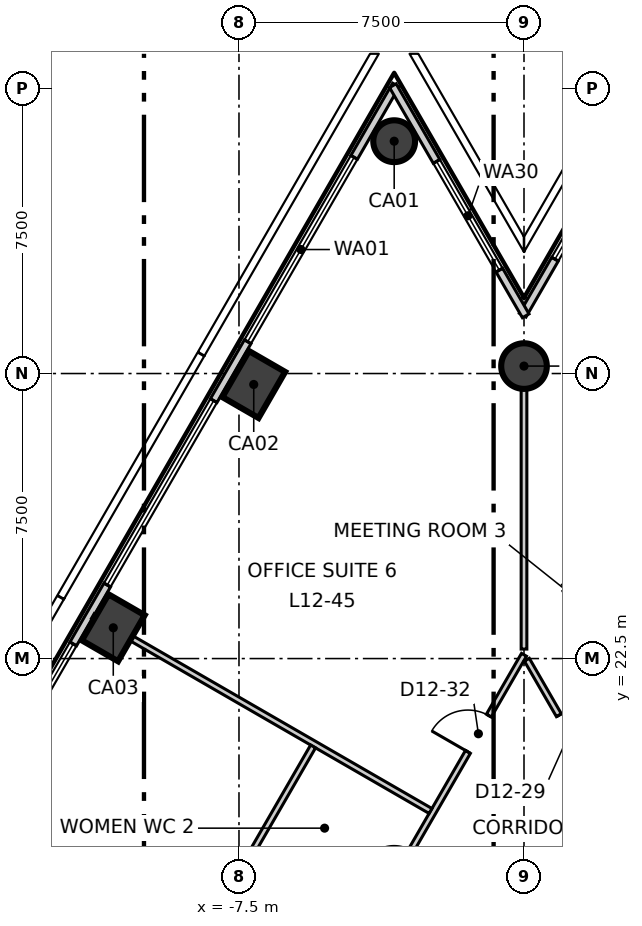
"""IFC4 building model, lengths in metres.
Left out: names, types, materials, properties, quantities, classifications, styles, units other than length and angle.
Written with IfcOpenShell. Run it as: python <this file> out.ifc"""

import sys

from ifc_helpers import new_model, si_unit, direction, frame, frame_2d, origin, origin_2d, place, context, subcontext, project, spatial, rectangle, circle, extrude, element, fill, save


model = new_model("IFC4")
c1 = context("Model", 3, precision=1e-05, world=origin(), true_north=direction((0.0, 1.0)))
c2 = subcontext(c1, "Body", "Model", "MODEL_VIEW")
j1 = project(units=[si_unit("LENGTHUNIT", "METRE"), si_unit("PLANEANGLEUNIT", "RADIAN")], contexts=[c1])
p1 = place(None, origin())
s1 = spatial("IfcSite", under=j1, at=p1, CompositionType="ELEMENT")
p2 = place(p1, origin())
s2 = spatial("IfcBuilding", under=s1, at=p2, CompositionType="ELEMENT")
p3 = place(p2, frame((0.0, 0.0, 59.3)))
s3 = spatial("IfcBuildingStorey", under=s2, at=p3, CompositionType="ELEMENT", Elevation=59.3)
p4 = place(p3, frame((-3.416, 36.113, -0.3), z_axis=(0.0, 0.0, 1.0), x_axis=(0.5, 0.866025403784, 0.0)))
e1 = element("IfcColumn", 1, at=p4, inside=s3, PredefinedType="COLUMN", context=c2, shape_type="SweptSolid", body=[
    extrude(circle(Radius=0.55, at=origin_2d()), origin(), (0.0, 0.0, 1.0), 4.0),
])
for number, where, z_axis, x_axis in (
    (2, (-7.112, 29.712, -0.3), (0.0, 0.0, 1.0), (0.5, 0.866, 0.0)),
    (3, (-10.808, 23.31, -0.3), (0.0, 0.0, 1.0), (0.5, 0.866, 0.0)),
):
    element("IfcColumn", number, at=place(p3, frame(where, z_axis=z_axis, x_axis=x_axis)), inside=s3, PredefinedType="COLUMN", context=c2, shape_type="SweptSolid", body=[
        extrude(rectangle(XDim=1.4, YDim=1.1, at=origin_2d()), origin(), (0.0, 0.0, 1.0), 4.0),
    ])
p5 = place(p3, frame((0.0, 30.196, -0.3), z_axis=(0.0, 0.0, 1.0), x_axis=(1.0, 0.0, 0.0)))
e4 = element("IfcColumn", 4, at=p5, inside=s3, PredefinedType="COLUMN", context=c2, shape_type="SweptSolid", body=[
    extrude(circle(Radius=0.6, at=origin_2d()), origin(), (0.0, 0.0, 1.0), 4.0),
])
p6 = place(p3, frame((-3.371, 37.591, 0.0), z_axis=(0.0, 0.0, 1.0), x_axis=(-0.500006313899, -0.866021758423, 0.0)))
e5 = element("IfcWall", 5, at=p6, inside=s3, PredefinedType="ELEMENTEDWALL", context=c2, shape_type="SweptSolid", body=[
    extrude(rectangle(XDim=61.719, YDim=0.2, at=frame_2d((30.859, 0.0))), origin(), (0.0, 0.0, 1.0), 3.7),
])
p7 = place(p6, frame((2.198, 0.0, 0.9)))
e6 = element("IfcOpeningElement", 6, at=p7, cuts=e5, PredefinedType="OPENING", context=c2, shape_type="SweptSolid", body=[
    extrude(rectangle(XDim=5.6, YDim=2.5, at=frame_2d((2.8, 1.25))), frame((0.0, 0.11, 0.0), z_axis=(0.0, -1.0, 0.0), x_axis=(1.0, 0.0, 0.0)), (0.0, 0.0, 1.0), 0.22),
])
p8 = place(p6, frame((9.59, 0.0, 0.9)))
e7 = element("IfcOpeningElement", 7, at=p8, cuts=e5, PredefinedType="OPENING", context=c2, shape_type="SweptSolid", body=[
    extrude(rectangle(XDim=5.6, YDim=2.5, at=frame_2d((2.8, 1.25))), frame((0.0, 0.11, 0.0), z_axis=(0.0, -1.0, 0.0), x_axis=(1.0, 0.0, 0.0)), (0.0, 0.0, 1.0), 0.22),
])
p9 = place(p6, frame((16.982, 0.0, 0.9)))
e8 = element("IfcOpeningElement", 8, at=p9, cuts=e5, PredefinedType="OPENING", context=c2, shape_type="SweptSolid", body=[
    extrude(rectangle(XDim=5.6, YDim=2.5, at=frame_2d((2.8, 1.25))), frame((0.0, 0.11, 0.0), z_axis=(0.0, -1.0, 0.0), x_axis=(1.0, 0.0, 0.0)), (0.0, 0.0, 1.0), 0.22),
])
p10 = place(p6, frame((24.373, 0.0, 0.9)))
e9 = element("IfcOpeningElement", 9, at=p10, cuts=e5, PredefinedType="OPENING", context=c2, shape_type="SweptSolid", body=[
    extrude(rectangle(XDim=5.6, YDim=2.5, at=frame_2d((2.8, 1.25))), frame((0.0, 0.11, 0.0), z_axis=(0.0, -1.0, 0.0), x_axis=(1.0, 0.0, 0.0)), (0.0, 0.0, 1.0), 0.22),
])
p11 = place(p6, frame((31.765, 0.0, 0.9)))
e10 = element("IfcOpeningElement", 10, at=p11, cuts=e5, PredefinedType="OPENING", context=c2, shape_type="SweptSolid", body=[
    extrude(rectangle(XDim=5.6, YDim=2.5, at=frame_2d((2.8, 1.25))), frame((0.0, 0.11, 0.0), z_axis=(0.0, -1.0, 0.0), x_axis=(1.0, 0.0, 0.0)), (0.0, 0.0, 1.0), 0.22),
])
p12 = place(p6, frame((39.157, 0.0, 0.9)))
e11 = element("IfcOpeningElement", 11, at=p12, cuts=e5, PredefinedType="OPENING", context=c2, shape_type="SweptSolid", body=[
    extrude(rectangle(XDim=5.6, YDim=2.5, at=frame_2d((2.8, 1.25))), frame((0.0, 0.11, 0.0), z_axis=(0.0, -1.0, 0.0), x_axis=(1.0, 0.0, 0.0)), (0.0, 0.0, 1.0), 0.22),
])
p13 = place(p6, frame((46.548, 0.0, 0.9)))
e12 = element("IfcOpeningElement", 12, at=p13, cuts=e5, PredefinedType="OPENING", context=c2, shape_type="SweptSolid", body=[
    extrude(rectangle(XDim=5.6, YDim=2.5, at=frame_2d((2.8, 1.25))), frame((0.0, 0.11, 0.0), z_axis=(0.0, -1.0, 0.0), x_axis=(1.0, 0.0, 0.0)), (0.0, 0.0, 1.0), 0.22),
])
p14 = place(p6, frame((53.94, 0.0, 0.9)))
e13 = element("IfcOpeningElement", 13, at=p14, cuts=e5, PredefinedType="OPENING", context=c2, shape_type="SweptSolid", body=[
    extrude(rectangle(XDim=5.6, YDim=2.5, at=frame_2d((2.8, 1.25))), frame((0.0, 0.11, 0.0), z_axis=(0.0, -1.0, 0.0), x_axis=(1.0, 0.0, 0.0)), (0.0, 0.0, 1.0), 0.22),
])
p15 = place(p3, frame((3.461, 37.591, 0.0), z_axis=(0.0, 0.0, 1.0), x_axis=(-0.499927968592, -0.866066987143, 0.0)))
e14 = element("IfcWall", 14, at=p15, inside=s3, PredefinedType="ELEMENTEDWALL", context=c2, shape_type="SweptSolid", body=[
    extrude(rectangle(XDim=6.993, YDim=0.2, at=frame_2d((3.496, 0.0))), origin(), (0.0, 0.0, 1.0), 3.7),
])
p16 = place(p15, frame((1.99, 0.0, 0.9)))
e15 = element("IfcOpeningElement", 15, at=p16, cuts=e14, PredefinedType="OPENING", context=c2, shape_type="SweptSolid", body=[
    extrude(rectangle(XDim=3.3, YDim=2.5, at=frame_2d((1.65, 1.25))), frame((0.0, 0.11, 0.0), z_axis=(0.0, -1.0, 0.0), x_axis=(1.0, 0.0, 0.0)), (0.0, 0.0, 1.0), 0.22),
])
p17 = place(p3, frame((0.045, 31.518, 0.0), z_axis=(0.0, 0.0, 1.0), x_axis=(-0.499943085557, 0.86605826086, 0.0)))
e16 = element("IfcWall", 16, at=p17, inside=s3, PredefinedType="ELEMENTEDWALL", context=c2, shape_type="SweptSolid", body=[
    extrude(rectangle(XDim=6.992, YDim=0.2, at=frame_2d((3.496, 0.0))), origin(), (0.0, 0.0, 1.0), 3.7),
])
p18 = place(p17, frame((1.39, 0.0, 0.9)))
e17 = element("IfcOpeningElement", 17, at=p18, cuts=e16, PredefinedType="OPENING", context=c2, shape_type="SweptSolid", body=[
    extrude(rectangle(XDim=3.3, YDim=2.5, at=frame_2d((1.65, 1.25))), frame((0.0, 0.11, 0.0), z_axis=(0.0, -1.0, 0.0), x_axis=(1.0, 0.0, 0.0)), (0.0, 0.0, 1.0), 0.22),
])
p19 = place(p3, frame((-19.497, -11.17, 0.0), z_axis=(0.0, 0.0, 1.0), x_axis=(0.499998854553, 0.866026065108, 0.0)))
e18 = element("IfcWall", 18, at=p19, inside=s3, PredefinedType="PARTITIONING", context=c2, shape_type="SweptSolid", body=[
    extrude(rectangle(XDim=38.994, YDim=0.15, at=frame_2d((19.497, 0.0))), origin(), (0.0, 0.0, 1.0), 3.7),
])
p20 = place(p19, frame((36.044, 0.0, 0.0)))
e19 = element("IfcOpeningElement", 19, at=p20, cuts=e18, PredefinedType="OPENING", context=c2, shape_type="SweptSolid", body=[
    extrude(rectangle(XDim=1.1, YDim=2.1, at=frame_2d((0.55, 1.05))), frame((0.0, 0.085, 0.0), z_axis=(0.0, -1.0, 0.0), x_axis=(1.0, 0.0, 0.0)), (0.0, 0.0, 1.0), 0.17),
])
p21 = place(p19, frame((21.855, 0.0, 0.0)))
e20 = element("IfcOpeningElement", 20, at=p21, cuts=e18, PredefinedType="OPENING", context=c2, shape_type="SweptSolid", body=[
    extrude(rectangle(XDim=1.1, YDim=2.1, at=frame_2d((0.55, 1.05))), frame((0.0, 0.085, 0.0), z_axis=(0.0, -1.0, 0.0), x_axis=(1.0, 0.0, 0.0)), (0.0, 0.0, 1.0), 0.17),
])
p22 = place(p19, frame((32.155, 0.0, 0.0)))
e21 = element("IfcOpeningElement", 21, at=p22, cuts=e18, PredefinedType="OPENING", context=c2, shape_type="SweptSolid", body=[
    extrude(rectangle(XDim=0.9, YDim=2.1, at=frame_2d((0.45, 1.05))), frame((0.0, 0.085, 0.0), z_axis=(0.0, -1.0, 0.0), x_axis=(1.0, 0.0, 0.0)), (0.0, 0.0, 1.0), 0.17),
])
p23 = place(p19, frame((28.955, 0.0, 0.0)))
e22 = element("IfcOpeningElement", 22, at=p23, cuts=e18, PredefinedType="OPENING", context=c2, shape_type="SweptSolid", body=[
    extrude(rectangle(XDim=0.9, YDim=2.1, at=frame_2d((0.45, 1.05))), frame((0.0, 0.085, 0.0), z_axis=(0.0, -1.0, 0.0), x_axis=(1.0, 0.0, 0.0)), (0.0, 0.0, 1.0), 0.17),
])
p24 = place(p19, frame((26.055, 0.0, 0.0)))
e23 = element("IfcOpeningElement", 23, at=p24, cuts=e18, PredefinedType="OPENING", context=c2, shape_type="SweptSolid", body=[
    extrude(rectangle(XDim=1.0, YDim=2.1, at=frame_2d((0.5, 1.05))), frame((0.0, 0.085, 0.0), z_axis=(0.0, -1.0, 0.0), x_axis=(1.0, 0.0, 0.0)), (0.0, 0.0, 1.0), 0.17),
])
p25 = place(p19, frame((10.373, 0.0, 0.0)))
e24 = element("IfcOpeningElement", 24, at=p25, cuts=e18, PredefinedType="OPENING", context=c2, shape_type="SweptSolid", body=[
    extrude(rectangle(XDim=1.0, YDim=2.1, at=frame_2d((0.5, 1.05))), frame((0.0, 0.085, 0.0), z_axis=(0.0, -1.0, 0.0), x_axis=(1.0, 0.0, 0.0)), (0.0, 0.0, 1.0), 0.17),
])
p26 = place(p19, frame((17.773, 0.0, 0.0)))
e25 = element("IfcOpeningElement", 25, at=p26, cuts=e18, PredefinedType="OPENING", context=c2, shape_type="SweptSolid", body=[
    extrude(rectangle(XDim=0.9, YDim=2.1, at=frame_2d((0.45, 1.05))), frame((0.0, 0.085, 0.0), z_axis=(0.0, -1.0, 0.0), x_axis=(1.0, 0.0, 0.0)), (0.0, 0.0, 1.0), 0.17),
])
p27 = place(p19, frame((1.689, 0.0, 0.0)))
e26 = element("IfcOpeningElement", 26, at=p27, cuts=e18, PredefinedType="OPENING", context=c2, shape_type="SweptSolid", body=[
    extrude(rectangle(XDim=1.1, YDim=2.1, at=frame_2d((0.55, 1.05))), frame((0.0, 0.085, 0.0), z_axis=(0.0, -1.0, 0.0), x_axis=(1.0, 0.0, 0.0)), (0.0, 0.0, 1.0), 0.17),
])
p28 = place(p3, frame((-11.345, 23.62, 0.0), z_axis=(0.0, 0.0, 1.0), x_axis=(0.866010033384, -0.500026621369, 0.0)))
e27 = element("IfcWall", 27, at=p28, inside=s3, PredefinedType="PARTITIONING", context=c2, shape_type="SweptSolid", body=[
    extrude(rectangle(XDim=10.26, YDim=0.15, at=frame_2d((5.13, 0.0))), origin(), (0.0, 0.0, 1.0), 3.7),
])
p29 = place(p3, frame((-9.912, 12.631, 0.0), z_axis=(0.0, 0.0, 1.0), x_axis=(0.49992187278, 0.866070505857, 0.0)))
e28 = element("IfcWall", 28, at=p29, inside=s3, PredefinedType="PARTITIONING", context=c2, shape_type="SweptSolid", body=[
    extrude(rectangle(XDim=8.726, YDim=0.15, at=frame_2d((4.363, 0.0))), origin(), (0.0, 0.0, 1.0), 3.7),
])
p30 = place(p3, frame((0.0, 22.75, 0.0), z_axis=(0.0, 0.0, 1.0), x_axis=(0.0, 1.0, 0.0)))
e29 = element("IfcWall", 29, at=p30, inside=s3, PredefinedType="PARTITIONING", context=c2, shape_type="SweptSolid", body=[
    extrude(rectangle(XDim=8.066, YDim=0.15, at=frame_2d((4.033, 0.0))), origin(), (0.0, 0.0, 1.0), 3.1),
])
p31 = place(p3, frame((0.075, 22.47, 0.0), z_axis=(0.0, 0.0, 1.0), x_axis=(0.500002280369, -0.866024087209, 0.0)))
e30 = element("IfcWall", 30, at=p31, inside=s3, PredefinedType="PARTITIONING", context=c2, shape_type="SweptSolid", body=[
    extrude(rectangle(XDim=38.844, YDim=0.15, at=frame_2d((19.422, 0.0))), origin(), (0.0, 0.0, 1.0), 3.7),
])
p32 = place(p31, frame((36.044, 0.0, 0.0)))
e31 = element("IfcOpeningElement", 31, at=p32, cuts=e30, PredefinedType="OPENING", context=c2, shape_type="SweptSolid", body=[
    extrude(rectangle(XDim=1.1, YDim=2.1, at=frame_2d((0.55, 1.05))), frame((0.0, 0.085, 0.0), z_axis=(0.0, -1.0, 0.0), x_axis=(1.0, 0.0, 0.0)), (0.0, 0.0, 1.0), 0.17),
])
p33 = place(p31, frame((26.255, 0.0, 0.0)))
e32 = element("IfcOpeningElement", 32, at=p33, cuts=e30, PredefinedType="OPENING", context=c2, shape_type="SweptSolid", body=[
    extrude(rectangle(XDim=1.1, YDim=2.1, at=frame_2d((0.55, 1.05))), frame((0.0, 0.085, 0.0), z_axis=(0.0, -1.0, 0.0), x_axis=(1.0, 0.0, 0.0)), (0.0, 0.0, 1.0), 0.17),
])
p34 = place(p31, frame((9.173, 0.0, 0.0)))
e33 = element("IfcOpeningElement", 33, at=p34, cuts=e30, PredefinedType="OPENING", context=c2, shape_type="SweptSolid", body=[
    extrude(rectangle(XDim=1.1, YDim=2.1, at=frame_2d((0.55, 1.05))), frame((0.0, 0.085, 0.0), z_axis=(0.0, -1.0, 0.0), x_axis=(1.0, 0.0, 0.0)), (0.0, 0.0, 1.0), 0.17),
])
p35 = place(p31, frame((17.373, 0.0, 0.0)))
e34 = element("IfcOpeningElement", 34, at=p35, cuts=e30, PredefinedType="OPENING", context=c2, shape_type="SweptSolid", body=[
    extrude(rectangle(XDim=0.9, YDim=2.1, at=frame_2d((0.45, 1.05))), frame((0.0, 0.085, 0.0), z_axis=(0.0, -1.0, 0.0), x_axis=(1.0, 0.0, 0.0)), (0.0, 0.0, 1.0), 0.17),
])
p36 = place(p31, frame((14.173, 0.0, 0.0)))
e35 = element("IfcOpeningElement", 35, at=p36, cuts=e30, PredefinedType="OPENING", context=c2, shape_type="SweptSolid", body=[
    extrude(rectangle(XDim=0.9, YDim=2.1, at=frame_2d((0.45, 1.05))), frame((0.0, 0.085, 0.0), z_axis=(0.0, -1.0, 0.0), x_axis=(1.0, 0.0, 0.0)), (0.0, 0.0, 1.0), 0.17),
])
p37 = place(p31, frame((11.273, 0.0, 0.0)))
e36 = element("IfcOpeningElement", 36, at=p37, cuts=e30, PredefinedType="OPENING", context=c2, shape_type="SweptSolid", body=[
    extrude(rectangle(XDim=1.0, YDim=2.1, at=frame_2d((0.5, 1.05))), frame((0.0, 0.085, 0.0), z_axis=(0.0, -1.0, 0.0), x_axis=(1.0, 0.0, 0.0)), (0.0, 0.0, 1.0), 0.17),
])
p38 = place(p31, frame((1.689, 0.0, 0.0)))
e37 = element("IfcOpeningElement", 37, at=p38, cuts=e30, PredefinedType="OPENING", context=c2, shape_type="SweptSolid", body=[
    extrude(rectangle(XDim=1.1, YDim=2.1, at=frame_2d((0.55, 1.05))), frame((0.0, 0.085, 0.0), z_axis=(0.0, -1.0, 0.0), x_axis=(1.0, 0.0, 0.0)), (0.0, 0.0, 1.0), 0.17),
])
p39 = place(p7, origin())
e38 = element("IfcWindow", 38, at=p39, inside=s3, PartitioningType="SINGLE_PANEL", PredefinedType="WINDOW", context=c2, shape_type="SweptSolid", body=[
    extrude(rectangle(XDim=5.6, YDim=2.5, at=frame_2d((2.8, 1.25))), frame((0.0, 0.03, 0.0), z_axis=(0.0, -1.0, 0.0), x_axis=(1.0, 0.0, 0.0)), (0.0, 0.0, 1.0), 0.06),
])
fill(e6, e38)
p40 = place(p8, origin())
e39 = element("IfcWindow", 39, at=p40, inside=s3, PartitioningType="SINGLE_PANEL", PredefinedType="WINDOW", context=c2, shape_type="SweptSolid", body=[
    extrude(rectangle(XDim=5.6, YDim=2.5, at=frame_2d((2.8, 1.25))), frame((0.0, 0.03, 0.0), z_axis=(0.0, -1.0, 0.0), x_axis=(1.0, 0.0, 0.0)), (0.0, 0.0, 1.0), 0.06),
])
fill(e7, e39)
p41 = place(p9, origin())
e40 = element("IfcWindow", 40, at=p41, inside=s3, PartitioningType="SINGLE_PANEL", PredefinedType="WINDOW", context=c2, shape_type="SweptSolid", body=[
    extrude(rectangle(XDim=5.6, YDim=2.5, at=frame_2d((2.8, 1.25))), frame((0.0, 0.03, 0.0), z_axis=(0.0, -1.0, 0.0), x_axis=(1.0, 0.0, 0.0)), (0.0, 0.0, 1.0), 0.06),
])
fill(e8, e40)
p42 = place(p16, origin())
e41 = element("IfcWindow", 41, at=p42, inside=s3, PartitioningType="SINGLE_PANEL", PredefinedType="WINDOW", context=c2, shape_type="SweptSolid", body=[
    extrude(rectangle(XDim=3.3, YDim=2.5, at=frame_2d((1.65, 1.25))), frame((0.0, 0.03, 0.0), z_axis=(0.0, -1.0, 0.0), x_axis=(1.0, 0.0, 0.0)), (0.0, 0.0, 1.0), 0.06),
])
fill(e15, e41)
p43 = place(p18, origin())
e42 = element("IfcWindow", 42, at=p43, inside=s3, PartitioningType="SINGLE_PANEL", PredefinedType="WINDOW", context=c2, shape_type="SweptSolid", body=[
    extrude(rectangle(XDim=3.3, YDim=2.5, at=frame_2d((1.65, 1.25))), frame((0.0, 0.03, 0.0), z_axis=(0.0, -1.0, 0.0), x_axis=(1.0, 0.0, 0.0)), (0.0, 0.0, 1.0), 0.06),
])
fill(e17, e42)
p44 = place(p38, origin())
e43 = element("IfcDoor", 43, at=p44, inside=s3, OperationType="SINGLE_SWING_LEFT", PredefinedType="DOOR", context=c2, shape_type="SweptSolid", body=[
    extrude(rectangle(XDim=1.1, YDim=2.1, at=frame_2d((0.55, 1.05))), frame((0.0, 0.025, 0.0), z_axis=(0.0, -1.0, 0.0), x_axis=(1.0, 0.0, 0.0)), (0.0, 0.0, 1.0), 0.05),
])
fill(e37, e43)
p45 = place(p20, origin())
e44 = element("IfcDoor", 44, at=p45, inside=s3, OperationType="SINGLE_SWING_RIGHT", PredefinedType="DOOR", context=c2, shape_type="SweptSolid", body=[
    extrude(rectangle(XDim=1.1, YDim=2.1, at=frame_2d((0.55, 1.05))), frame((0.0, 0.025, 0.0), z_axis=(0.0, -1.0, 0.0), x_axis=(1.0, 0.0, 0.0)), (0.0, 0.0, 1.0), 0.05),
])
fill(e19, e44)
save(model, sys.argv[1])
